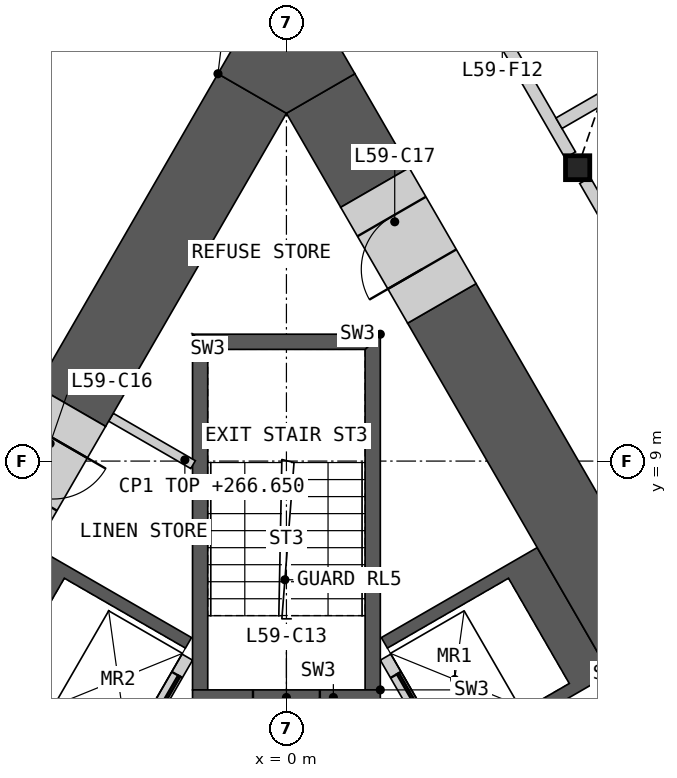
"""IFC4 building model, lengths in metres.
Left out: names, types, materials, properties, quantities, classifications, styles, units other than length and angle.
Written with IfcOpenShell. Run it as: python <this file> out.ifc"""

import sys

from ifc_helpers import new_model, si_unit, direction, frame, frame_2d, origin, origin_2d, place, context, subcontext, project, spatial, polyline, rectangle, i_section, outline, extrude, element, fill, save


model = new_model("IFC4")
c1 = context("Model", 3, precision=1e-05, world=origin(), true_north=direction((0.0, 1.0)))
c2 = subcontext(c1, "Body", "Model", "MODEL_VIEW")
j1 = project(units=[si_unit("LENGTHUNIT", "METRE"), si_unit("PLANEANGLEUNIT", "RADIAN")], contexts=[c1])
p1 = place(None, origin())
s1 = spatial("IfcSite", under=j1, at=p1, CompositionType="ELEMENT")
p2 = place(p1, origin())
s2 = spatial("IfcBuilding", under=s1, at=p2, CompositionType="ELEMENT")
p3 = place(p2, frame((0.0, 0.0, 263.4)))
s3 = spatial("IfcBuildingStorey", under=s2, at=p3, CompositionType="ELEMENT", Elevation=263.4)
p4 = place(p3, frame((4.789, 13.825, 0.0), z_axis=(0.0, 0.0, 1.0), x_axis=(1.0, 0.0, 0.0)))
e1 = element("IfcColumn", 1, at=p4, inside=s3, PredefinedType="COLUMN", context=c2, shape_type="SweptSolid", body=[
    extrude(i_section(OverallWidth=0.399, OverallDepth=0.393, WebThickness=0.023, FlangeThickness=0.037, at=origin_2d()), origin(), (0.0, 0.0, 1.0), 3.6),
])
p5 = place(p3, origin())
e2 = element("IfcWall", 2, at=p5, inside=s3, PredefinedType="SHEAR", context=c2, shape_type="SweptSolid", body=[
    extrude(outline(polyline([(5.324, 5.499), (4.931, 5.272), (2.76, 4.019), (2.66, 4.192), (4.652, 5.342), (3.652, 7.074), (1.66, 5.924), (1.561, 6.097), (3.731, 7.35), (4.124, 7.577), (5.324, 5.499)])), origin(), (0.0, 0.0, 1.0), 3.25),
])
p6 = place(p3, frame((5.817, -1.476, 0.0), z_axis=(0.0, 0.0, 1.0), x_axis=(-0.500002616675, 0.866023893041, 0.0)))
e3 = element("IfcWall", 3, at=p6, inside=s3, PredefinedType="SOLIDWALL", context=c2, shape_type="SweptSolid", body=[
    extrude(rectangle(XDim=8.373, YDim=0.2, at=frame_2d((4.187, 0.0))), origin(), (0.0, 0.0, 1.0), 3.25),
])
p7 = place(p6, frame((1.537, 0.0, 0.0)))
e4 = element("IfcOpeningElement", 4, at=p7, cuts=e3, PredefinedType="OPENING", context=c2, shape_type="SweptSolid", body=[
    extrude(rectangle(XDim=0.9, YDim=2.1, at=frame_2d((0.45, 1.05))), frame((0.0, 0.11, 0.0), z_axis=(0.0, -1.0, 0.0), x_axis=(1.0, 0.0, 0.0)), (0.0, 0.0, 1.0), 0.22),
])
p8 = place(p6, frame((4.837, 0.0, 0.0)))
e5 = element("IfcOpeningElement", 5, at=p8, cuts=e3, PredefinedType="OPENING", context=c2, shape_type="SweptSolid", body=[
    extrude(rectangle(XDim=0.9, YDim=2.1, at=frame_2d((0.45, 1.05))), frame((0.0, 0.11, 0.0), z_axis=(0.0, -1.0, 0.0), x_axis=(1.0, 0.0, 0.0)), (0.0, 0.0, 1.0), 0.22),
])
p9 = place(p6, frame((6.937, 0.0, 0.0)))
e6 = element("IfcOpeningElement", 6, at=p9, cuts=e3, PredefinedType="OPENING", context=c2, shape_type="SweptSolid", body=[
    extrude(rectangle(XDim=1.1, YDim=2.1, at=frame_2d((0.55, 1.05))), frame((0.0, 0.11, 0.0), z_axis=(0.0, -1.0, 0.0), x_axis=(1.0, 0.0, 0.0)), (0.0, 0.0, 1.0), 0.22),
])
p10 = place(p3, origin())
e7 = element("IfcWall", 7, at=p10, inside=s3, PredefinedType="SHEAR", context=c2, shape_type="SweptSolid", body=[
    extrude(outline(polyline([(-7.524, 1.688), (-4.124, 7.577), (-3.731, 7.35), (-1.561, 6.097), (-1.66, 5.924), (-3.652, 7.074), (-4.652, 5.342), (-2.66, 4.192), (-2.76, 4.019), (-4.752, 5.169), (-5.752, 3.437), (-3.76, 2.287), (-3.861, 2.113), (-5.852, 3.263), (-6.852, 1.531), (-4.861, 0.381), (-4.96, 0.208), (-7.131, 1.461), (-7.524, 1.688)])), origin(), (0.0, 0.0, 1.0), 3.25),
])
p11 = place(p3, frame((-1.631, 5.776, 0.0), z_axis=(0.0, 0.0, 1.0), x_axis=(-0.499992876559, -0.866029516466, 0.0)))
e8 = element("IfcWall", 8, at=p11, inside=s3, PredefinedType="SOLIDWALL", context=c2, shape_type="SweptSolid", body=[
    extrude(rectangle(XDim=6.486, YDim=0.2, at=frame_2d((3.243, 0.0))), origin(), (0.0, 0.0, 1.0), 3.25),
])
p12 = place(p11, frame((0.337, 0.0, 0.0)))
e9 = element("IfcOpeningElement", 9, at=p12, cuts=e8, PredefinedType="OPENING", context=c2, shape_type="SweptSolid", body=[
    extrude(rectangle(XDim=1.1, YDim=2.1, at=frame_2d((0.55, 1.05))), frame((0.0, 0.11, 0.0), z_axis=(0.0, -1.0, 0.0), x_axis=(1.0, 0.0, 0.0)), (0.0, 0.0, 1.0), 0.22),
])
p13 = place(p11, frame((2.537, 0.0, 0.0)))
e10 = element("IfcOpeningElement", 10, at=p13, cuts=e8, PredefinedType="OPENING", context=c2, shape_type="SweptSolid", body=[
    extrude(rectangle(XDim=1.1, YDim=2.1, at=frame_2d((0.55, 1.05))), frame((0.0, 0.11, 0.0), z_axis=(0.0, -1.0, 0.0), x_axis=(1.0, 0.0, 0.0)), (0.0, 0.0, 1.0), 0.22),
])
p14 = place(p3, origin())
e11 = element("IfcWall", 11, at=p14, inside=s3, PredefinedType="SHEAR", context=c2, shape_type="SweptSolid", body=[
    extrude(outline(polyline([(1.544, 5.237), (1.544, 11.087), (1.294, 10.837), (1.294, 5.237), (1.544, 5.237)])), origin(), (0.0, 0.0, 1.0), 3.25),
])
p15 = place(p3, origin())
e12 = element("IfcWall", 12, at=p15, inside=s3, PredefinedType="SHEAR", context=c2, shape_type="SweptSolid", body=[
    extrude(outline(polyline([(1.544, 11.087), (-1.544, 11.087), (-1.294, 10.837), (1.294, 10.837), (1.544, 11.087)])), origin(), (0.0, 0.0, 1.0), 3.25),
])
p16 = place(p3, origin())
e13 = element("IfcWall", 13, at=p16, inside=s3, PredefinedType="SHEAR", context=c2, shape_type="SweptSolid", body=[
    extrude(outline(polyline([(-1.294, 10.837), (-1.544, 11.087), (-1.544, 5.237), (-1.294, 5.237), (-1.294, 10.837)])), origin(), (0.0, 0.0, 1.0), 3.25),
])
p17 = place(p3, frame((1.544, 5.112, 0.0), z_axis=(0.0, 0.0, 1.0), x_axis=(-1.0, 0.0, 0.0)))
e14 = element("IfcWall", 14, at=p17, inside=s3, PredefinedType="SHEAR", context=c2, shape_type="SweptSolid", body=[
    extrude(rectangle(XDim=3.088, YDim=0.25, at=frame_2d((1.544, 0.0))), origin(), (0.0, 0.0, 1.0), 3.25),
])
p18 = place(p17, frame((0.994, 0.0, 0.0)))
e15 = element("IfcOpeningElement", 15, at=p18, cuts=e14, PredefinedType="OPENING", context=c2, shape_type="SweptSolid", body=[
    extrude(rectangle(XDim=1.1, YDim=2.1, at=frame_2d((0.55, 1.05))), frame((0.0, 0.135, 0.0), z_axis=(0.0, -1.0, 0.0), x_axis=(1.0, 0.0, 0.0)), (0.0, 0.0, 1.0), 0.27),
])
p19 = place(p3, frame((-2.886, 9.721, 0.0), z_axis=(0.0, 0.0, 1.0), x_axis=(0.865990094875, -0.500061151839, 0.0)))
e16 = element("IfcWall", 16, at=p19, inside=s3, PredefinedType="PARTITIONING", context=c2, shape_type="SweptSolid", body=[
    extrude(rectangle(XDim=1.56, YDim=0.15, at=frame_2d((0.78, 0.0))), origin(), (0.0, 0.0, 1.0), 3.25),
])
p20 = place(p3, frame((10.081, -1.441, 0.0), z_axis=(0.0, 0.0, 1.0), x_axis=(-0.500012180433, 0.866018371294, 0.0)))
e17 = element("IfcWall", 17, at=p20, inside=s3, PredefinedType="SHEAR", context=c2, shape_type="SweptSolid", body=[
    extrude(rectangle(XDim=15.05, YDim=1.3, at=frame_2d((7.525, 0.0))), origin(), (0.0, 0.0, 1.0), 3.25),
])
p21 = place(p3, frame((1.456, 13.499, 0.0), z_axis=(0.0, 0.0, 1.0), x_axis=(-0.499990639951, 0.866030807744, 0.0)))
e18 = element("IfcWall", 18, at=p21, inside=s3, PredefinedType="SHEAR", context=c2, shape_type="SweptSolid", body=[
    extrude(rectangle(XDim=1.786, YDim=1.3, at=frame_2d((0.893, 0.0))), origin(), (0.0, 0.0, 1.0), 3.25),
])
p22 = place(p3, frame((-0.563, 15.045, 0.0), z_axis=(0.0, 0.0, 1.0), x_axis=(-0.500011498138, -0.866018765229, 0.0)))
e19 = element("IfcWall", 19, at=p22, inside=s3, PredefinedType="SHEAR", context=c2, shape_type="SweptSolid", body=[
    extrude(rectangle(XDim=5.947, YDim=1.3, at=frame_2d((2.973, 0.0))), origin(), (0.0, 0.0, 1.0), 3.25),
])
p23 = place(p3, origin())
e20 = element("IfcWall", 20, at=p23, inside=s3, PredefinedType="SHEAR", context=c2, shape_type="SweptSolid", body=[
    extrude(outline(polyline([(-1.126, 15.371), (0.0, 17.321), (1.126, 15.371), (0.0, 14.72), (-1.126, 15.371)])), origin(), (0.0, 0.0, 1.0), 3.25),
])
p24 = place(p3, frame((-3.536, 9.896, 0.0), z_axis=(0.0, 0.0, 1.0), x_axis=(-0.499981787252, -0.866035918664, 0.0)))
e21 = element("IfcWall", 21, at=p24, inside=s3, PredefinedType="SHEAR", context=c2, shape_type="SweptSolid", body=[
    extrude(rectangle(XDim=2.2, YDim=1.3, at=frame_2d((1.1, 0.0))), origin(), (0.0, 0.0, 1.0), 3.25),
])
p25 = place(p24, frame((0.6, 0.0, 0.0)))
e22 = element("IfcOpeningElement", 22, at=p25, cuts=e21, PredefinedType="OPENING", context=c2, shape_type="SweptSolid", body=[
    extrude(rectangle(XDim=1.0, YDim=2.1, at=frame_2d((0.5, 1.05))), frame((0.0, 0.66, 0.0), z_axis=(0.0, -1.0, 0.0), x_axis=(1.0, 0.0, 0.0)), (0.0, 0.0, 1.0), 1.32),
])
p26 = place(p3, frame((2.556, 11.593, 0.0), z_axis=(0.0, 0.0, 1.0), x_axis=(-0.499946605688, 0.86605622881, 0.0)))
e23 = element("IfcWall", 23, at=p26, inside=s3, PredefinedType="SHEAR", context=c2, shape_type="SweptSolid", body=[
    extrude(rectangle(XDim=2.2, YDim=1.3, at=frame_2d((1.1, 0.0))), origin(), (0.0, 0.0, 1.0), 3.25),
])
p27 = place(p26, frame((0.65, 0.0, 0.0)))
e24 = element("IfcOpeningElement", 24, at=p27, cuts=e23, PredefinedType="OPENING", context=c2, shape_type="SweptSolid", body=[
    extrude(rectangle(XDim=1.0, YDim=2.1, at=frame_2d((0.5, 1.05))), frame((0.0, 0.66, 0.0), z_axis=(0.0, -1.0, 0.0), x_axis=(1.0, 0.0, 0.0)), (0.0, 0.0, 1.0), 1.32),
])
p28 = place(p3, frame((4.91, 13.616, 0.0), z_axis=(0.0, 0.0, 1.0), x_axis=(0.50000207303, -0.866024206917, 0.0)))
e25 = element("IfcWall", 25, at=p28, inside=s3, PredefinedType="PARTITIONING", context=c2, shape_type="SweptSolid", body=[
    extrude(rectangle(XDim=9.095, YDim=0.2, at=frame_2d((4.547, 0.0))), origin(), (0.0, 0.0, 1.0), 3.25),
])
p29 = place(p28, frame((3.698, 0.0, 0.0)))
e26 = element("IfcOpeningElement", 26, at=p29, cuts=e25, PredefinedType="OPENING", context=c2, shape_type="SweptSolid", body=[
    extrude(rectangle(XDim=1.8, YDim=2.1, at=frame_2d((0.9, 1.05))), frame((0.0, 0.11, 0.0), z_axis=(0.0, -1.0, 0.0), x_axis=(1.0, 0.0, 0.0)), (0.0, 0.0, 1.0), 0.22),
])
p30 = place(p3, frame((1.913, 18.807, 0.0), z_axis=(0.0, 0.0, 1.0), x_axis=(0.499984524817, -0.866034338201, 0.0)))
e27 = element("IfcWall", 27, at=p30, inside=s3, PredefinedType="PARTITIONING", context=c2, shape_type="SweptSolid", body=[
    extrude(rectangle(XDim=5.51, YDim=0.2, at=frame_2d((2.755, 0.0))), origin(), (0.0, 0.0, 1.0), 3.25),
])
p31 = place(p30, frame((1.655, 0.0, 0.0)))
e28 = element("IfcOpeningElement", 28, at=p31, cuts=e27, PredefinedType="OPENING", context=c2, shape_type="SweptSolid", body=[
    extrude(rectangle(XDim=1.8, YDim=2.1, at=frame_2d((0.9, 1.05))), frame((0.0, 0.11, 0.0), z_axis=(0.0, -1.0, 0.0), x_axis=(1.0, 0.0, 0.0)), (0.0, 0.0, 1.0), 0.22),
])
p32 = place(p3, frame((4.482, 14.557, 0.0), z_axis=(0.0, 0.0, 1.0), x_axis=(0.866030620616, 0.499990964073, 0.0)))
e29 = element("IfcWall", 29, at=p32, inside=s3, PredefinedType="PARTITIONING", context=c2, shape_type="SweptSolid", body=[
    extrude(rectangle(XDim=12.304, YDim=0.2, at=frame_2d((6.152, 0.0))), origin(), (0.0, 0.0, 1.0), 2.404),
])
p33 = place(p9, origin())
e30 = element("IfcDoor", 30, at=p33, inside=s3, OperationType="SLIDING_TO_LEFT", PredefinedType="DOOR", context=c2, shape_type="SweptSolid", body=[
    extrude(rectangle(XDim=1.1, YDim=2.1, at=frame_2d((0.55, 1.05))), frame((0.0, 0.025, 0.0), z_axis=(0.0, -1.0, 0.0), x_axis=(1.0, 0.0, 0.0)), (0.0, 0.0, 1.0), 0.05),
])
fill(e6, e30)
p34 = place(p12, origin())
e31 = element("IfcDoor", 31, at=p34, inside=s3, OperationType="SLIDING_TO_LEFT", PredefinedType="DOOR", context=c2, shape_type="SweptSolid", body=[
    extrude(rectangle(XDim=1.1, YDim=2.1, at=frame_2d((0.55, 1.05))), frame((0.0, 0.025, 0.0), z_axis=(0.0, -1.0, 0.0), x_axis=(1.0, 0.0, 0.0)), (0.0, 0.0, 1.0), 0.05),
])
fill(e9, e31)
p35 = place(p18, origin())
e32 = element("IfcDoor", 32, at=p35, inside=s3, OperationType="SINGLE_SWING_LEFT", PredefinedType="DOOR", context=c2, shape_type="SweptSolid", body=[
    extrude(rectangle(XDim=1.1, YDim=2.1, at=frame_2d((0.55, 1.05))), frame((0.0, 0.025, 0.0), z_axis=(0.0, -1.0, 0.0), x_axis=(1.0, 0.0, 0.0)), (0.0, 0.0, 1.0), 0.05),
])
fill(e15, e32)
p36 = place(p25, origin())
e33 = element("IfcDoor", 33, at=p36, inside=s3, OperationType="SINGLE_SWING_LEFT", PredefinedType="DOOR", context=c2, shape_type="SweptSolid", body=[
    extrude(rectangle(XDim=1.0, YDim=2.1, at=frame_2d((0.5, 1.05))), frame((0.0, 0.405, 0.0), z_axis=(0.0, -1.0, 0.0), x_axis=(1.0, 0.0, 0.0)), (0.0, 0.0, 1.0), 0.05),
])
fill(e22, e33)
p37 = place(p27, origin())
e34 = element("IfcDoor", 34, at=p37, inside=s3, OperationType="SINGLE_SWING_LEFT", PredefinedType="DOOR", context=c2, shape_type="SweptSolid", body=[
    extrude(rectangle(XDim=1.0, YDim=2.1, at=frame_2d((0.5, 1.05))), frame((0.0, 0.405, 0.0), z_axis=(0.0, -1.0, 0.0), x_axis=(1.0, 0.0, 0.0)), (0.0, 0.0, 1.0), 0.05),
])
fill(e24, e34)
save(model, sys.argv[1])
